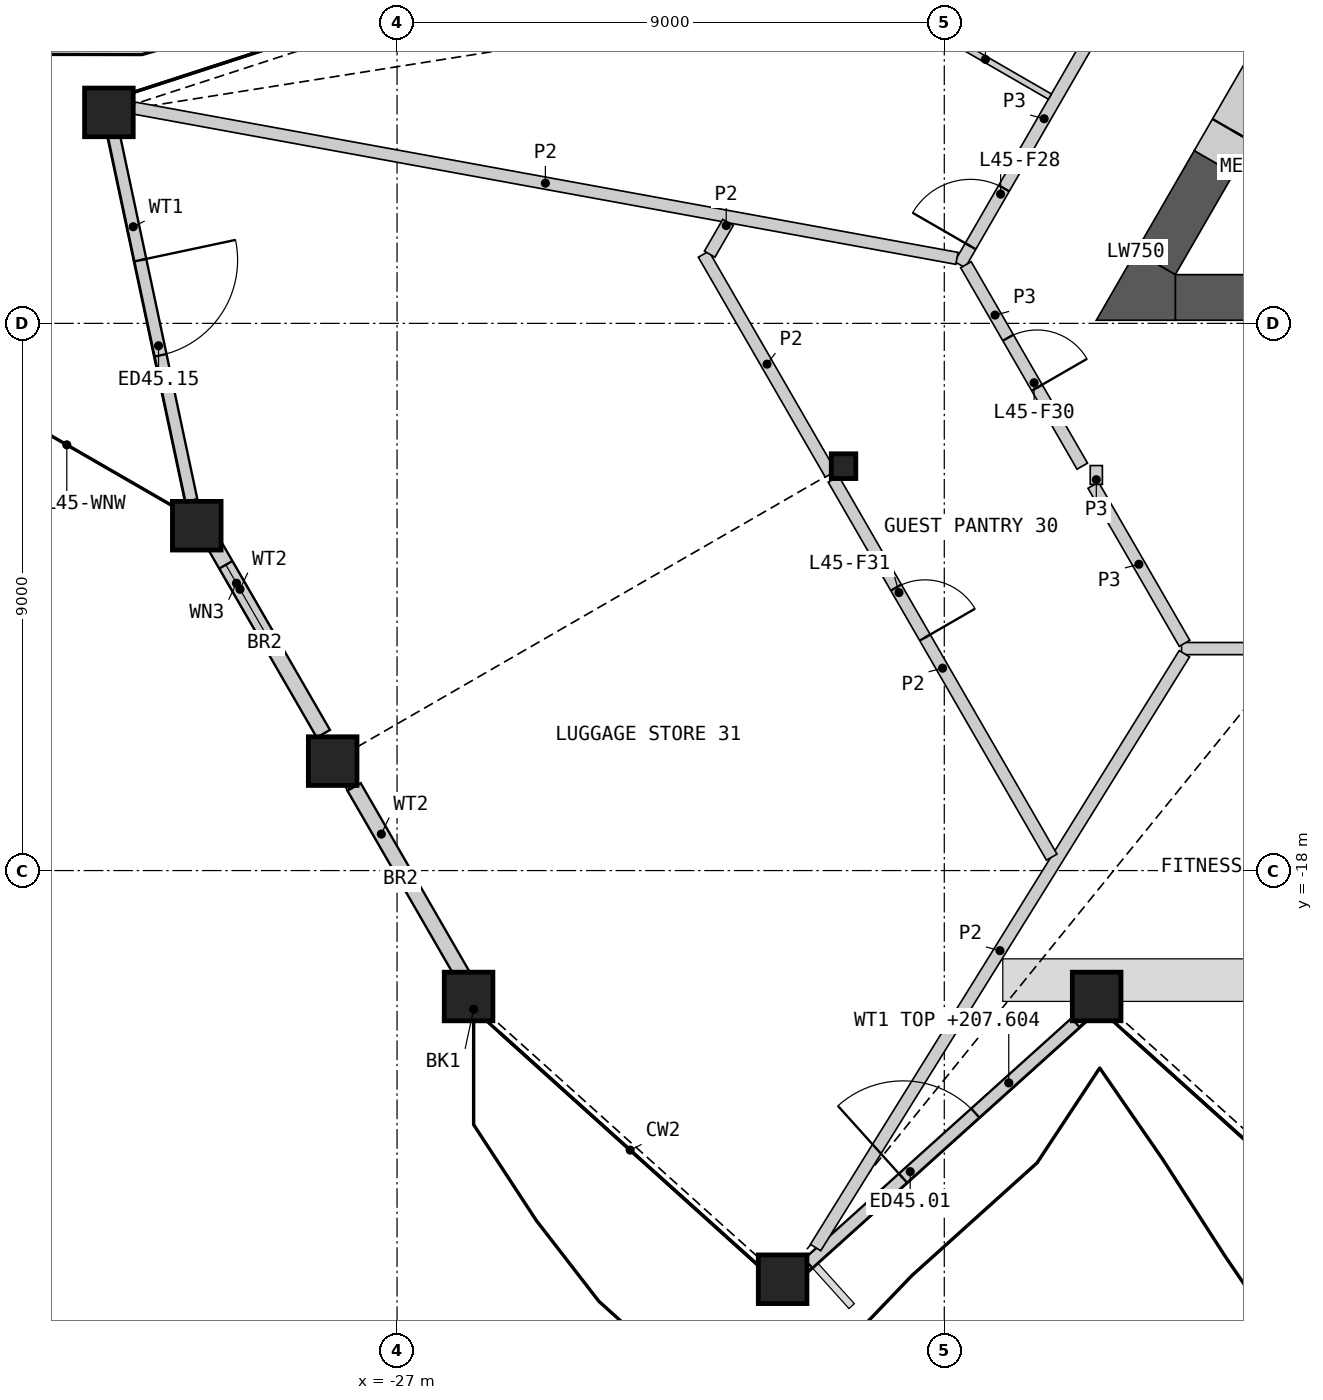
"""IFC4 building model, lengths in metres.
Left out: names, types, materials, properties, quantities, classifications, styles, units other than length and angle.
Written with IfcOpenShell. Run it as: python <this file> out.ifc"""

import sys

from ifc_helpers import new_model, si_unit, direction, frame, frame_2d, origin, origin_2d, place, context, subcontext, project, spatial, polyline, rectangle, hollow_rectangle, i_section, outline, extrude, element, fill, save


model = new_model("IFC4")
c1 = context("Model", 3, precision=1e-05, world=origin(), true_north=direction((0.0, 1.0)))
c2 = subcontext(c1, "Body", "Model", "MODEL_VIEW")
j1 = project(units=[si_unit("LENGTHUNIT", "METRE"), si_unit("PLANEANGLEUNIT", "RADIAN")], contexts=[c1])
p1 = place(None, origin())
s1 = spatial("IfcSite", under=j1, at=p1, CompositionType="ELEMENT")
p2 = place(p1, origin())
s2 = spatial("IfcBuilding", under=s1, at=p2, CompositionType="ELEMENT")
p3 = place(p2, frame((0.0, 0.0, 205.2)))
s3 = spatial("IfcBuildingStorey", under=s2, at=p3, CompositionType="ELEMENT", Elevation=205.2)
for number, where, z_axis, x_axis in (
    (1, (-25.823, -20.071, 0.0), (0.0, 0.0, 1.0), (1.0, 0.0, 0.0)),
    (2, (-20.659, -24.722, 0.0), (0.0, 0.0, 1.0), (1.0, 0.0, 0.0)),
    (3, (-15.494, -20.071, 0.0), (0.0, 0.0, 1.0), (1.0, 0.0, 0.0)),
    (4, (-31.739, -5.53, 0.0), (0.0, 0.0, 1.0), (1.0, 0.0, 0.0)),
    (5, (-30.294, -12.328, 0.0), (0.0, 0.0, 1.0), (1.0, 0.0, 0.0)),
    (6, (-28.059, -16.2, 0.0), (0.0, 0.0, 1.0), (1.0, 0.0, 0.0)),
):
    element("IfcColumn", number, at=place(p3, frame(where, z_axis=z_axis, x_axis=x_axis)), inside=s3, PredefinedType="COLUMN", context=c2, shape_type="SweptSolid", body=[
        extrude(hollow_rectangle(XDim=0.8, YDim=0.8, WallThickness=0.05, at=origin_2d()), origin(), (0.0, 0.0, 1.0), 3.6),
    ])
p4 = place(p3, frame((-19.657, -11.349, 0.0), z_axis=(0.0, 0.0, 1.0), x_axis=(1.0, 0.0, 0.0)))
e7 = element("IfcColumn", 7, at=p4, inside=s3, PredefinedType="COLUMN", context=c2, shape_type="SweptSolid", body=[
    extrude(i_section(OverallWidth=0.404, OverallDepth=0.407, WebThickness=0.027, FlangeThickness=0.044, at=origin_2d()), origin(), (0.0, 0.0, 1.0), 3.6),
])
p5 = place(p3, frame((-20.237, -24.461, 0.0), z_axis=(0.0, 0.0, 1.0), x_axis=(0.743136116571, 0.669140278452, 0.0)))
e8 = element("IfcWall", 8, at=p5, inside=s3, PredefinedType="SOLIDWALL", context=c2, shape_type="SweptSolid", body=[
    extrude(rectangle(XDim=5.916, YDim=0.2, at=frame_2d((2.958, 0.0))), origin(), (0.0, 0.0, 1.0), 2.404),
])
p6 = place(p5, frame((2.096, 0.0, 0.0)))
e9 = element("IfcOpeningElement", 9, at=p6, cuts=e8, PredefinedType="OPENING", context=c2, shape_type="SweptSolid", body=[
    extrude(rectangle(XDim=1.6, YDim=2.4, at=frame_2d((0.8, 1.2))), frame((0.0, 0.11, 0.0), z_axis=(0.0, -1.0, 0.0), x_axis=(1.0, 0.0, 0.0)), (0.0, 0.0, 1.0), 0.22),
])
p7 = place(p3, frame((-31.657, -5.91, 0.0), z_axis=(0.0, 0.0, 1.0), x_axis=(0.207917293494, -0.978146409831, 0.0)))
e10 = element("IfcWall", 10, at=p7, inside=s3, PredefinedType="SOLIDWALL", context=c2, shape_type="SweptSolid", body=[
    extrude(rectangle(XDim=6.135, YDim=0.2, at=frame_2d((3.068, 0.0))), origin(), (0.0, 0.0, 1.0), 2.701),
])
p8 = place(p7, frame((2.096, 0.0, 0.0)))
e11 = element("IfcOpeningElement", 11, at=p8, cuts=e10, PredefinedType="OPENING", context=c2, shape_type="SweptSolid", body=[
    extrude(rectangle(XDim=1.6, YDim=2.4, at=frame_2d((0.8, 1.2))), frame((0.0, 0.11, 0.0), z_axis=(0.0, -1.0, 0.0), x_axis=(1.0, 0.0, 0.0)), (0.0, 0.0, 1.0), 0.22),
])
p9 = place(p3, frame((-30.041, -12.581, 0.0), z_axis=(0.0, 0.0, 1.0), x_axis=(0.499978523533, -0.866037802874, 0.0)))
e12 = element("IfcWall", 12, at=p9, inside=s3, PredefinedType="SOLIDWALL", context=c2, shape_type="SweptSolid", body=[
    extrude(rectangle(XDim=3.659, YDim=0.25, at=frame_2d((1.83, 0.0))), origin(), (0.0, 0.0, 1.0), 2.701),
])
p10 = place(p9, frame((0.45, 0.0, 1.7)))
e13 = element("IfcOpeningElement", 13, at=p10, cuts=e12, PredefinedType="OPENING", context=c2, shape_type="SweptSolid", body=[
    extrude(rectangle(XDim=1.4, YDim=0.8, at=frame_2d((0.7, 0.4))), frame((0.0, 0.135, 0.0), z_axis=(0.0, -1.0, 0.0), x_axis=(1.0, 0.0, 0.0)), (0.0, 0.0, 1.0), 0.27),
])
p11 = place(p3, frame((-27.706, -16.625, 0.0), z_axis=(0.0, 0.0, 1.0), x_axis=(0.500054932303, -0.865993686281, 0.0)))
e14 = element("IfcWall", 14, at=p11, inside=s3, PredefinedType="SOLIDWALL", context=c2, shape_type="SweptSolid", body=[
    extrude(rectangle(XDim=3.581, YDim=0.25, at=frame_2d((1.79, 0.0))), origin(), (0.0, 0.0, 1.0), 2.701),
])
p12 = place(p3, frame((-14.201, -8.574, 0.0), z_axis=(0.0, 0.0, 1.0), x_axis=(1.0, 0.0, 0.0)))
e15 = element("IfcWall", 15, at=p12, inside=s3, PredefinedType="SHEAR", context=c2, shape_type="SweptSolid", body=[
    extrude(rectangle(XDim=6.785, YDim=0.75, at=frame_2d((3.393, 0.0))), origin(), (0.0, 0.0, 1.0), 3.25),
])
p13 = place(p3, frame((-13.564, -6.346, 0.0), z_axis=(0.0, 0.0, 1.0), x_axis=(-0.499989888488, -0.86603124159, 0.0)))
e16 = element("IfcWall", 16, at=p13, inside=s3, PredefinedType="SHEAR", context=c2, shape_type="SweptSolid", body=[
    extrude(rectangle(XDim=1.923, YDim=0.75, at=frame_2d((0.961, 0.0))), origin(), (0.0, 0.0, 1.0), 3.25),
])
p14 = place(p3, origin())
e17 = element("IfcWall", 17, at=p14, inside=s3, PredefinedType="SHEAR", context=c2, shape_type="SweptSolid", body=[
    extrude(outline(polyline([(-14.851, -7.824), (-14.201, -8.199), (-14.201, -8.949), (-15.5, -8.949), (-14.851, -7.824)])), origin(), (0.0, 0.0, 1.0), 3.25),
])
p15 = place(p3, frame((-12.464, -4.441, 0.0), z_axis=(0.0, 0.0, 1.0), x_axis=(-0.499994660107, -0.866028486751, 0.0)))
e18 = element("IfcWall", 18, at=p15, inside=s3, PredefinedType="SHEAR", context=c2, shape_type="SweptSolid", body=[
    extrude(rectangle(XDim=2.2, YDim=0.75, at=frame_2d((1.1, 0.0))), origin(), (0.0, 0.0, 1.0), 3.25),
])
p16 = place(p15, frame((0.6, 0.0, 0.0)))
e19 = element("IfcOpeningElement", 19, at=p16, cuts=e18, PredefinedType="OPENING", context=c2, shape_type="SweptSolid", body=[
    extrude(rectangle(XDim=1.0, YDim=2.1, at=frame_2d((0.5, 1.05))), frame((0.0, 0.385, 0.0), z_axis=(0.0, -1.0, 0.0), x_axis=(1.0, 0.0, 0.0)), (0.0, 0.0, 1.0), 0.77),
])
p17 = place(p3, frame((-14.099, -14.349, 0.0), z_axis=(0.0, 0.0, 1.0), x_axis=(1.0, 0.0, 0.0)))
e20 = element("IfcWall", 20, at=p17, inside=s3, PredefinedType="PARTITIONING", context=c2, shape_type="SweptSolid", body=[
    extrude(rectangle(XDim=28.198, YDim=0.2, at=frame_2d((14.099, 0.0))), origin(), (0.0, 0.0, 1.0), 3.25),
])
p18 = place(p17, frame((1.053, 0.0, 0.0)))
e21 = element("IfcOpeningElement", 21, at=p18, cuts=e20, PredefinedType="OPENING", context=c2, shape_type="SweptSolid", body=[
    extrude(rectangle(XDim=1.8, YDim=2.1, at=frame_2d((0.9, 1.05))), frame((0.0, 0.11, 0.0), z_axis=(0.0, -1.0, 0.0), x_axis=(1.0, 0.0, 0.0)), (0.0, 0.0, 1.0), 0.22),
])
p19 = place(p17, frame((4.064, 0.0, 0.0)))
e22 = element("IfcOpeningElement", 22, at=p19, cuts=e20, PredefinedType="OPENING", context=c2, shape_type="SweptSolid", body=[
    extrude(rectangle(XDim=1.0, YDim=2.1, at=frame_2d((0.5, 1.05))), frame((0.0, 0.11, 0.0), z_axis=(0.0, -1.0, 0.0), x_axis=(1.0, 0.0, 0.0)), (0.0, 0.0, 1.0), 0.22),
])
p20 = place(p17, frame((12.796, 0.0, 0.0)))
e23 = element("IfcOpeningElement", 23, at=p20, cuts=e20, PredefinedType="OPENING", context=c2, shape_type="SweptSolid", body=[
    extrude(rectangle(XDim=1.0, YDim=2.1, at=frame_2d((0.5, 1.05))), frame((0.0, 0.11, 0.0), z_axis=(0.0, -1.0, 0.0), x_axis=(1.0, 0.0, 0.0)), (0.0, 0.0, 1.0), 0.22),
])
p21 = place(p17, frame((18.318, 0.0, 0.0)))
e24 = element("IfcOpeningElement", 24, at=p21, cuts=e20, PredefinedType="OPENING", context=c2, shape_type="SweptSolid", body=[
    extrude(rectangle(XDim=1.8, YDim=2.1, at=frame_2d((0.9, 1.05))), frame((0.0, 0.11, 0.0), z_axis=(0.0, -1.0, 0.0), x_axis=(1.0, 0.0, 0.0)), (0.0, 0.0, 1.0), 0.22),
])
p22 = place(p17, frame((25.345, 0.0, 0.0)))
e25 = element("IfcOpeningElement", 25, at=p22, cuts=e20, PredefinedType="OPENING", context=c2, shape_type="SweptSolid", body=[
    extrude(rectangle(XDim=1.8, YDim=2.1, at=frame_2d((0.9, 1.05))), frame((0.0, 0.11, 0.0), z_axis=(0.0, -1.0, 0.0), x_axis=(1.0, 0.0, 0.0)), (0.0, 0.0, 1.0), 0.22),
])
p23 = place(p3, frame((-17.744, -8.035, 0.0), z_axis=(0.0, 0.0, 1.0), x_axis=(0.500003221507, 0.866023543838, 0.0)))
e26 = element("IfcWall", 26, at=p23, inside=s3, PredefinedType="PARTITIONING", context=c2, shape_type="SweptSolid", body=[
    extrude(rectangle(XDim=5.545, YDim=0.2, at=frame_2d((2.772, 0.0))), origin(), (0.0, 0.0, 1.0), 3.25),
])
p24 = place(p23, frame((0.351, 0.0, 0.0)))
e27 = element("IfcOpeningElement", 27, at=p24, cuts=e26, PredefinedType="OPENING", context=c2, shape_type="SweptSolid", body=[
    extrude(rectangle(XDim=1.1, YDim=2.1, at=frame_2d((0.55, 1.05))), frame((0.0, 0.11, 0.0), z_axis=(0.0, -1.0, 0.0), x_axis=(1.0, 0.0, 0.0)), (0.0, 0.0, 1.0), 0.22),
])
p25 = place(p3, frame((-17.644, -8.035, 0.0), z_axis=(0.0, 0.0, 1.0), x_axis=(0.499961815444, -0.866047448526, 0.0)))
e28 = element("IfcWall", 28, at=p25, inside=s3, PredefinedType="PARTITIONING", context=c2, shape_type="SweptSolid", body=[
    extrude(rectangle(XDim=3.826, YDim=0.2, at=frame_2d((1.913, 0.0))), origin(), (0.0, 0.0, 1.0), 3.25),
])
p26 = place(p25, frame((1.386, 0.0, 0.0)))
e29 = element("IfcOpeningElement", 29, at=p26, cuts=e28, PredefinedType="OPENING", context=c2, shape_type="SweptSolid", body=[
    extrude(rectangle(XDim=0.95, YDim=2.1, at=frame_2d((0.475, 1.05))), frame((0.0, 0.11, 0.0), z_axis=(0.0, -1.0, 0.0), x_axis=(1.0, 0.0, 0.0)), (0.0, 0.0, 1.0), 0.22),
])
p27 = place(p3, frame((-15.55, -11.662, 0.0), z_axis=(0.0, 0.0, 1.0), x_axis=(0.500048608389, -0.865997337899, 0.0)))
e30 = element("IfcWall", 30, at=p27, inside=s3, PredefinedType="PARTITIONING", context=c2, shape_type="SweptSolid", body=[
    extrude(rectangle(XDim=3.002, YDim=0.2, at=frame_2d((1.501, 0.0))), origin(), (0.0, 0.0, 1.0), 3.25),
])
p28 = place(p3, frame((-15.5, -11.649, 0.0), z_axis=(0.0, 0.0, 1.0), x_axis=(0.0, 1.0, 0.0)))
e31 = element("IfcWall", 31, at=p28, inside=s3, PredefinedType="PARTITIONING", context=c2, shape_type="SweptSolid", body=[
    extrude(rectangle(XDim=0.31, YDim=0.2, at=frame_2d((0.155, 0.0))), origin(), (0.0, 0.0, 1.0), 3.25),
])
p29 = place(p3, frame((-31.329, -5.458, 0.0), z_axis=(0.0, 0.0, 1.0), x_axis=(0.983720538919, -0.179705039744, 0.0)))
e32 = element("IfcWall", 32, at=p29, inside=s3, PredefinedType="PARTITIONING", context=c2, shape_type="SweptSolid", body=[
    extrude(rectangle(XDim=13.761, YDim=0.2, at=frame_2d((6.88, 0.0))), origin(), (0.0, 0.0, 1.0), 2.404),
])
p30 = place(p3, frame((-20.117, -24.2, 0.0), z_axis=(0.0, 0.0, 1.0), x_axis=(0.527576403825, 0.849507585679, 0.0)))
e33 = element("IfcWall", 33, at=p30, inside=s3, PredefinedType="PARTITIONING", context=c2, shape_type="SweptSolid", body=[
    extrude(rectangle(XDim=11.497, YDim=0.2, at=frame_2d((5.749, 0.0))), origin(), (0.0, 0.0, 1.0), 2.404),
])
p31 = place(p3, frame((-19.822, -11.562, 0.0), z_axis=(0.0, 0.0, 1.0), x_axis=(0.500008997517, -0.866020209003, 0.0)))
e34 = element("IfcWall", 34, at=p31, inside=s3, PredefinedType="PARTITIONING", context=c2, shape_type="SweptSolid", body=[
    extrude(rectangle(XDim=7.178, YDim=0.2, at=frame_2d((3.589, 0.0))), origin(), (0.0, 0.0, 1.0), 2.404),
])
p32 = place(p31, frame((2.059, 0.0, 0.0)))
e35 = element("IfcOpeningElement", 35, at=p32, cuts=e34, PredefinedType="OPENING", context=c2, shape_type="SweptSolid", body=[
    extrude(rectangle(XDim=0.95, YDim=2.1, at=frame_2d((0.475, 1.05))), frame((0.0, 0.11, 0.0), z_axis=(0.0, -1.0, 0.0), x_axis=(1.0, 0.0, 0.0)), (0.0, 0.0, 1.0), 0.22),
])
p33 = place(p3, frame((-21.958, -7.862, 0.0), z_axis=(0.0, 0.0, 1.0), x_axis=(0.499987304225, -0.866032733569, 0.0)))
e36 = element("IfcWall", 36, at=p33, inside=s3, PredefinedType="PARTITIONING", context=c2, shape_type="SweptSolid", body=[
    extrude(rectangle(XDim=4.176, YDim=0.2, at=frame_2d((2.088, 0.0))), origin(), (0.0, 0.0, 1.0), 2.404),
])
p34 = place(p3, frame((-21.859, -7.862, 0.0), z_axis=(0.0, 0.0, 1.0), x_axis=(0.50022374246, 0.865896187473, 0.0)))
e37 = element("IfcWall", 37, at=p34, inside=s3, PredefinedType="PARTITIONING", context=c2, shape_type="SweptSolid", body=[
    extrude(rectangle(XDim=0.604, YDim=0.2, at=frame_2d((0.302, 0.0))), origin(), (0.0, 0.0, 1.0), 2.404),
])
p35 = place(p3, frame((-18.385, -4.046, 0.0), z_axis=(0.0, 0.0, 1.0), x_axis=(0.866057815567, -0.499943856944, 0.0)))
e38 = element("IfcWall", 38, at=p35, inside=s3, PredefinedType="PARTITIONING", context=c2, shape_type="SweptSolid", body=[
    extrude(rectangle(XDim=2.45, YDim=0.1, at=frame_2d((1.225, 0.0))), origin(), (0.0, 0.0, 1.0), 2.404),
])
p36 = place(p6, origin())
e39 = element("IfcDoor", 39, at=p36, inside=s3, OperationType="DOUBLE_DOOR_SINGLE_SWING", PredefinedType="DOOR", context=c2, shape_type="SweptSolid", body=[
    extrude(rectangle(XDim=1.6, YDim=2.4, at=frame_2d((0.8, 1.2))), frame((0.0, 0.025, 0.0), z_axis=(0.0, -1.0, 0.0), x_axis=(1.0, 0.0, 0.0)), (0.0, 0.0, 1.0), 0.05),
])
fill(e9, e39)
p37 = place(p8, origin())
e40 = element("IfcDoor", 40, at=p37, inside=s3, OperationType="DOUBLE_DOOR_SINGLE_SWING", PredefinedType="DOOR", context=c2, shape_type="SweptSolid", body=[
    extrude(rectangle(XDim=1.6, YDim=2.4, at=frame_2d((0.8, 1.2))), frame((0.0, 0.025, 0.0), z_axis=(0.0, -1.0, 0.0), x_axis=(1.0, 0.0, 0.0)), (0.0, 0.0, 1.0), 0.05),
])
fill(e11, e40)
p38 = place(p10, origin())
e41 = element("IfcWindow", 41, at=p38, inside=s3, PartitioningType="SINGLE_PANEL", PredefinedType="WINDOW", context=c2, shape_type="SweptSolid", body=[
    extrude(rectangle(XDim=1.4, YDim=0.8, at=frame_2d((0.7, 0.4))), frame((0.0, 0.03, 0.0), z_axis=(0.0, -1.0, 0.0), x_axis=(1.0, 0.0, 0.0)), (0.0, 0.0, 1.0), 0.06),
])
fill(e13, e41)
p39 = place(p16, origin())
e42 = element("IfcDoor", 42, at=p39, inside=s3, OperationType="SINGLE_SWING_RIGHT", PredefinedType="DOOR", context=c2, shape_type="SweptSolid", body=[
    extrude(rectangle(XDim=1.0, YDim=2.1, at=frame_2d((0.5, 1.05))), frame((0.0, 0.13, 0.0), z_axis=(0.0, -1.0, 0.0), x_axis=(1.0, 0.0, 0.0)), (0.0, 0.0, 1.0), 0.05),
])
fill(e19, e42)
p40 = place(p24, origin())
e43 = element("IfcDoor", 43, at=p40, inside=s3, OperationType="SINGLE_SWING_LEFT", PredefinedType="DOOR", context=c2, shape_type="SweptSolid", body=[
    extrude(rectangle(XDim=1.1, YDim=2.1, at=frame_2d((0.55, 1.05))), frame((0.0, 0.025, 0.0), z_axis=(0.0, -1.0, 0.0), x_axis=(1.0, 0.0, 0.0)), (0.0, 0.0, 1.0), 0.05),
])
fill(e27, e43)
p41 = place(p26, origin())
e44 = element("IfcDoor", 44, at=p41, inside=s3, OperationType="SINGLE_SWING_RIGHT", PredefinedType="DOOR", context=c2, shape_type="SweptSolid", body=[
    extrude(rectangle(XDim=0.95, YDim=2.1, at=frame_2d((0.475, 1.05))), frame((0.0, 0.025, 0.0), z_axis=(0.0, -1.0, 0.0), x_axis=(1.0, 0.0, 0.0)), (0.0, 0.0, 1.0), 0.05),
])
fill(e29, e44)
p42 = place(p32, origin())
e45 = element("IfcDoor", 45, at=p42, inside=s3, OperationType="SINGLE_SWING_RIGHT", PredefinedType="DOOR", context=c2, shape_type="SweptSolid", body=[
    extrude(rectangle(XDim=0.95, YDim=2.1, at=frame_2d((0.475, 1.05))), frame((0.0, 0.025, 0.0), z_axis=(0.0, -1.0, 0.0), x_axis=(1.0, 0.0, 0.0)), (0.0, 0.0, 1.0), 0.05),
])
fill(e35, e45)
save(model, sys.argv[1])
